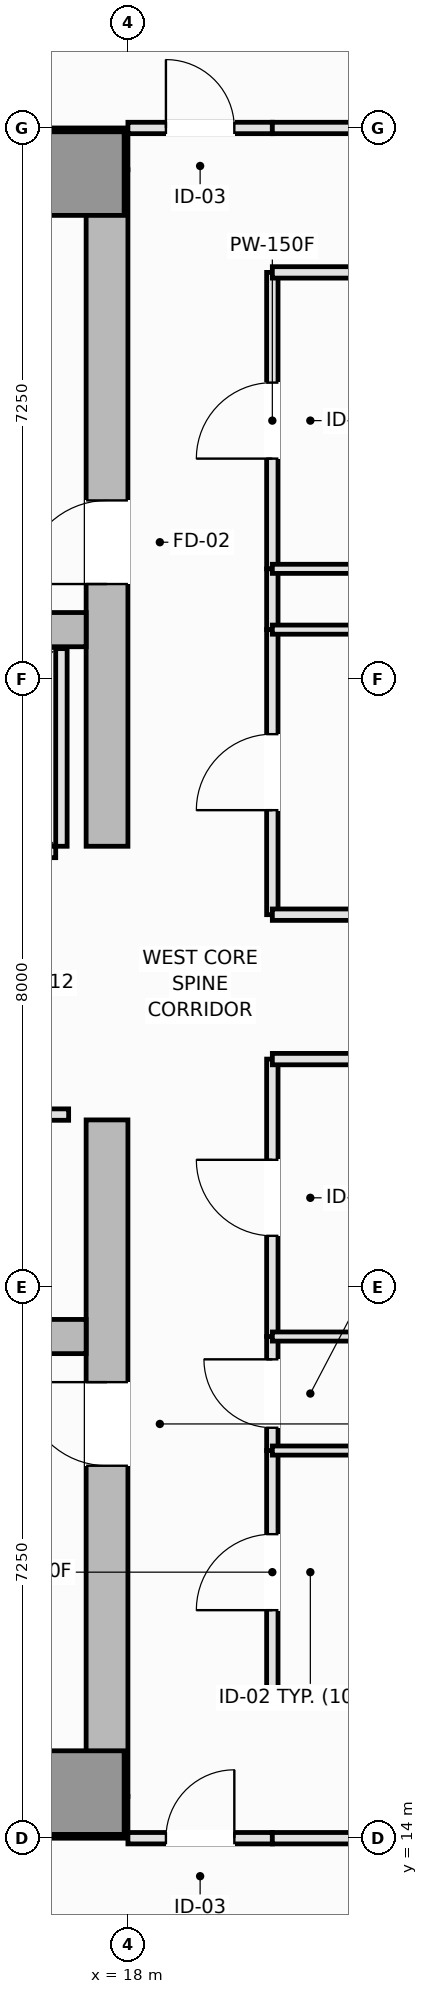
"""IFC4 building model, lengths in metres.
Left out: names, types, materials, properties, quantities, classifications, styles, units other than length and angle.
Written with IfcOpenShell. Run it as: python <this file> out.ifc"""

import sys

from ifc_helpers import new_model, si_unit, direction, frame, frame_2d, origin, origin_2d, place, context, subcontext, project, spatial, rectangle, extrude, element, fill, save


model = new_model("IFC4")
c1 = context("Model", 3, precision=1e-05, world=origin(), true_north=direction((0.0, 1.0)))
c2 = subcontext(c1, "Body", "Model", "MODEL_VIEW")
j1 = project(units=[si_unit("LENGTHUNIT", "METRE"), si_unit("PLANEANGLEUNIT", "RADIAN")], contexts=[c1])
p1 = place(None, origin())
s1 = spatial("IfcSite", under=j1, at=p1, CompositionType="ELEMENT")
p2 = place(p1, origin())
s2 = spatial("IfcBuilding", under=s1, at=p2, CompositionType="ELEMENT")
p3 = place(p2, frame((0.0, 0.0, 212.9)))
s3 = spatial("IfcBuildingStorey", under=s2, at=p3, CompositionType="ELEMENT", Elevation=212.9)
for number, where, z_axis, x_axis in (
    (1, (4.5, 14.275, 0.0), (0.0, 0.0, 1.0), (1.0, 0.0, 0.0)),
    (2, (4.5, 36.225, 0.0), (0.0, 0.0, 1.0), (1.0, 0.0, 0.0)),
):
    element("IfcWall", number, at=place(p3, frame(where, z_axis=z_axis, x_axis=x_axis)), inside=s3, PredefinedType="SHEAR", context=c2, shape_type="SweptSolid", body=[
        extrude(rectangle(XDim=13.5, YDim=0.55, at=frame_2d((6.75, 0.0))), origin(), (0.0, 0.0, 1.0), 3.55),
    ])
p4 = place(p3, frame((17.725, 14.55, 0.0), z_axis=(0.0, 0.0, 1.0), x_axis=(0.0, 1.0, 0.0)))
e3 = element("IfcWall", 3, at=p4, inside=s3, PredefinedType="SHEAR", context=c2, shape_type="SweptSolid", body=[
    extrude(rectangle(XDim=8.9, YDim=0.55, at=frame_2d((4.45, 0.0))), origin(), (0.0, 0.0, 1.0), 3.55),
])
p5 = place(p4, frame((4.35, 0.0, 0.0)))
e4 = element("IfcOpeningElement", 4, at=p5, cuts=e3, PredefinedType="OPENING", context=c2, shape_type="SweptSolid", body=[
    extrude(rectangle(XDim=1.1, YDim=2.15, at=frame_2d((0.55, 1.075))), frame((0.0, 0.285, 0.0), z_axis=(0.0, -1.0, 0.0), x_axis=(1.0, 0.0, 0.0)), (0.0, 0.0, 1.0), 0.57),
])
p6 = place(p3, frame((17.725, 27.05, 0.0), z_axis=(0.0, 0.0, 1.0), x_axis=(0.0, 1.0, 0.0)))
e5 = element("IfcWall", 5, at=p6, inside=s3, PredefinedType="SHEAR", context=c2, shape_type="SweptSolid", body=[
    extrude(rectangle(XDim=8.9, YDim=0.55, at=frame_2d((4.45, 0.0))), origin(), (0.0, 0.0, 1.0), 3.55),
])
p7 = place(p6, frame((3.45, 0.0, 0.0)))
e6 = element("IfcOpeningElement", 6, at=p7, cuts=e5, PredefinedType="OPENING", context=c2, shape_type="SweptSolid", body=[
    extrude(rectangle(XDim=1.1, YDim=2.15, at=frame_2d((0.55, 1.075))), frame((0.0, 0.285, 0.0), z_axis=(0.0, -1.0, 0.0), x_axis=(1.0, 0.0, 0.0)), (0.0, 0.0, 1.0), 0.57),
])
for number, where, z_axis, x_axis in (
    (7, (5.05, 20.6, 0.0), (0.0, 0.0, 1.0), (1.0, 0.0, 0.0)),
    (8, (5.05, 29.9, 0.0), (0.0, 0.0, 1.0), (1.0, 0.0, 0.0)),
):
    element("IfcWall", number, at=place(p3, frame(where, z_axis=z_axis, x_axis=x_axis)), inside=s3, PredefinedType="SHEAR", context=c2, shape_type="SweptSolid", body=[
        extrude(rectangle(XDim=12.4, YDim=0.45, at=frame_2d((6.2, 0.0))), origin(), (0.0, 0.0, 1.0), 3.55),
    ])
for number, where, z_axis, x_axis in (
    (9, (17.4, 14.6, 0.0), (0.0, 0.0, 1.0), (1.0, 0.0, 0.0)),
    (10, (17.4, 35.9, 0.0), (0.0, 0.0, 1.0), (1.0, 0.0, 0.0)),
):
    element("IfcColumn", number, at=place(p3, frame(where, z_axis=z_axis, x_axis=x_axis)), inside=s3, PredefinedType="PILASTER", context=c2, shape_type="SweptSolid", body=[
        extrude(rectangle(XDim=1.1, YDim=1.1, at=origin_2d()), origin(), (0.0, 0.0, 1.0), 3.55),
    ])
p8 = place(p3, frame((14.5, 26.975, 0.0), z_axis=(0.0, 0.0, 1.0), x_axis=(1.0, 0.0, 0.0)))
e11 = element("IfcWall", 11, at=p8, inside=s3, PredefinedType="PARTITIONING", context=c2, shape_type="SweptSolid", body=[
    extrude(rectangle(XDim=2.55, YDim=0.15, at=frame_2d((1.275, 0.0))), origin(), (0.0, 0.0, 1.0), 3.37),
])
p9 = place(p8, frame((0.625, 0.0, 0.0)))
e12 = element("IfcOpeningElement", 12, at=p9, cuts=e11, PredefinedType="OPENING", context=c2, shape_type="SweptSolid", body=[
    extrude(rectangle(XDim=1.3, YDim=2.2, at=frame_2d((0.65, 1.1))), frame((0.0, 0.085, 0.0), z_axis=(0.0, -1.0, 0.0), x_axis=(1.0, 0.0, 0.0)), (0.0, 0.0, 1.0), 0.17),
])
p10 = place(p3, frame((17.125, 27.05, 0.0), z_axis=(0.0, 0.0, 1.0), x_axis=(0.0, 1.0, 0.0)))
e13 = element("IfcWall", 13, at=p10, inside=s3, PredefinedType="PARTITIONING", context=c2, shape_type="SweptSolid", body=[
    extrude(rectangle(XDim=2.6, YDim=0.15, at=frame_2d((1.3, 0.0))), origin(), (0.0, 0.0, 1.0), 3.37),
])
p11 = place(p3, frame((16.05, 23.52, 0.0), z_axis=(0.0, 0.0, 1.0), x_axis=(1.0, 0.0, 0.0)))
e14 = element("IfcWall", 14, at=p11, inside=s3, PredefinedType="PARTITIONING", context=c2, shape_type="SweptSolid", body=[
    extrude(rectangle(XDim=1.17, YDim=0.15, at=frame_2d((0.585, 0.0))), origin(), (0.0, 0.0, 1.0), 3.37),
])
p12 = place(p3, frame((19.9, 15.9, 0.0), z_axis=(0.0, 0.0, 1.0), x_axis=(0.0, 1.0, 0.0)))
e15 = element("IfcWall", 15, at=p12, inside=s3, PredefinedType="PARTITIONING", context=c2, shape_type="SweptSolid", body=[
    extrude(rectangle(XDim=3.2, YDim=0.15, at=frame_2d((1.6, 0.0))), origin(), (0.0, 0.0, 1.0), 3.37),
])
p13 = place(p12, frame((1.1, 0.0, 0.0)))
e16 = element("IfcOpeningElement", 16, at=p13, cuts=e15, PredefinedType="OPENING", context=c2, shape_type="SweptSolid", body=[
    extrude(rectangle(XDim=1.0, YDim=2.15, at=frame_2d((0.5, 1.075))), frame((0.0, 0.085, 0.0), z_axis=(0.0, -1.0, 0.0), x_axis=(1.0, 0.0, 0.0)), (0.0, 0.0, 1.0), 0.17),
])
p14 = place(p3, frame((19.9, 19.1, 0.0), z_axis=(0.0, 0.0, 1.0), x_axis=(0.0, 1.0, 0.0)))
e17 = element("IfcWall", 17, at=p14, inside=s3, PredefinedType="PARTITIONING", context=c2, shape_type="SweptSolid", body=[
    extrude(rectangle(XDim=1.5, YDim=0.15, at=frame_2d((0.75, 0.0))), origin(), (0.0, 0.0, 1.0), 3.37),
])
p15 = place(p14, frame((0.3, 0.0, 0.0)))
e18 = element("IfcOpeningElement", 18, at=p15, cuts=e17, PredefinedType="OPENING", context=c2, shape_type="SweptSolid", body=[
    extrude(rectangle(XDim=0.9, YDim=2.1, at=frame_2d((0.45, 1.05))), frame((0.0, 0.085, 0.0), z_axis=(0.0, -1.0, 0.0), x_axis=(1.0, 0.0, 0.0)), (0.0, 0.0, 1.0), 0.17),
])
p16 = place(p3, frame((19.9, 30.7, 0.0), z_axis=(0.0, 0.0, 1.0), x_axis=(0.0, 1.0, 0.0)))
e19 = element("IfcWall", 19, at=p16, inside=s3, PredefinedType="PARTITIONING", context=c2, shape_type="SweptSolid", body=[
    extrude(rectangle(XDim=3.9, YDim=0.15, at=frame_2d((1.95, 0.0))), origin(), (0.0, 0.0, 1.0), 3.37),
])
p17 = place(p16, frame((1.45, 0.0, 0.0)))
e20 = element("IfcOpeningElement", 20, at=p17, cuts=e19, PredefinedType="OPENING", context=c2, shape_type="SweptSolid", body=[
    extrude(rectangle(XDim=1.0, YDim=2.15, at=frame_2d((0.5, 1.075))), frame((0.0, 0.085, 0.0), z_axis=(0.0, -1.0, 0.0), x_axis=(1.0, 0.0, 0.0)), (0.0, 0.0, 1.0), 0.17),
])
p18 = place(p3, frame((19.9, 29.9, 0.0), z_axis=(0.0, 0.0, 1.0), x_axis=(0.0, 1.0, 0.0)))
e21 = element("IfcWall", 21, at=p18, inside=s3, PredefinedType="PARTITIONING", context=c2, shape_type="SweptSolid", body=[
    extrude(rectangle(XDim=0.8, YDim=0.15, at=frame_2d((0.4, 0.0))), origin(), (0.0, 0.0, 1.0), 3.37),
])
p19 = place(p3, frame((19.9, 20.6, 0.0), z_axis=(0.0, 0.0, 1.0), x_axis=(0.0, 1.0, 0.0)))
e22 = element("IfcWall", 22, at=p19, inside=s3, PredefinedType="PARTITIONING", context=c2, shape_type="SweptSolid", body=[
    extrude(rectangle(XDim=3.65, YDim=0.15, at=frame_2d((1.825, 0.0))), origin(), (0.0, 0.0, 1.0), 3.37),
])
p20 = place(p19, frame((1.325, 0.0, 0.0)))
e23 = element("IfcOpeningElement", 23, at=p20, cuts=e22, PredefinedType="OPENING", context=c2, shape_type="SweptSolid", body=[
    extrude(rectangle(XDim=1.0, YDim=2.15, at=frame_2d((0.5, 1.075))), frame((0.0, 0.085, 0.0), z_axis=(0.0, -1.0, 0.0), x_axis=(1.0, 0.0, 0.0)), (0.0, 0.0, 1.0), 0.17),
])
p21 = place(p3, frame((19.9, 26.15, 0.0), z_axis=(0.0, 0.0, 1.0), x_axis=(0.0, 1.0, 0.0)))
e24 = element("IfcWall", 24, at=p21, inside=s3, PredefinedType="PARTITIONING", context=c2, shape_type="SweptSolid", body=[
    extrude(rectangle(XDim=3.75, YDim=0.15, at=frame_2d((1.875, 0.0))), origin(), (0.0, 0.0, 1.0), 3.37),
])
p22 = place(p21, frame((1.375, 0.0, 0.0)))
e25 = element("IfcOpeningElement", 25, at=p22, cuts=e24, PredefinedType="OPENING", context=c2, shape_type="SweptSolid", body=[
    extrude(rectangle(XDim=1.0, YDim=2.15, at=frame_2d((0.5, 1.075))), frame((0.0, 0.085, 0.0), z_axis=(0.0, -1.0, 0.0), x_axis=(1.0, 0.0, 0.0)), (0.0, 0.0, 1.0), 0.17),
])
p23 = place(p3, frame((18.0, 14.0, 0.0), z_axis=(0.0, 0.0, 1.0), x_axis=(1.0, 0.0, 0.0)))
e26 = element("IfcWall", 26, at=p23, inside=s3, PredefinedType="PARTITIONING", context=c2, shape_type="SweptSolid", body=[
    extrude(rectangle(XDim=1.9, YDim=0.15, at=frame_2d((0.95, 0.0))), origin(), (0.0, 0.0, 1.0), 3.37),
])
p24 = place(p23, frame((0.5, 0.0, 0.0)))
e27 = element("IfcOpeningElement", 27, at=p24, cuts=e26, PredefinedType="OPENING", context=c2, shape_type="SweptSolid", body=[
    extrude(rectangle(XDim=0.9, YDim=2.1, at=frame_2d((0.45, 1.05))), frame((0.0, 0.085, 0.0), z_axis=(0.0, -1.0, 0.0), x_axis=(1.0, 0.0, 0.0)), (0.0, 0.0, 1.0), 0.17),
])
p25 = place(p3, frame((18.0, 36.5, 0.0), z_axis=(0.0, 0.0, 1.0), x_axis=(1.0, 0.0, 0.0)))
e28 = element("IfcWall", 28, at=p25, inside=s3, PredefinedType="PARTITIONING", context=c2, shape_type="SweptSolid", body=[
    extrude(rectangle(XDim=1.9, YDim=0.15, at=frame_2d((0.95, 0.0))), origin(), (0.0, 0.0, 1.0), 3.37),
])
p26 = place(p25, frame((0.5, 0.0, 0.0)))
e29 = element("IfcOpeningElement", 29, at=p26, cuts=e28, PredefinedType="OPENING", context=c2, shape_type="SweptSolid", body=[
    extrude(rectangle(XDim=0.9, YDim=2.1, at=frame_2d((0.45, 1.05))), frame((0.0, 0.085, 0.0), z_axis=(0.0, -1.0, 0.0), x_axis=(1.0, 0.0, 0.0)), (0.0, 0.0, 1.0), 0.17),
])
p27 = place(p3, frame((19.9, 24.25, 0.0), z_axis=(0.0, 0.0, 1.0), x_axis=(1.0, 0.0, 0.0)))
e30 = element("IfcWall", 30, at=p27, inside=s3, PredefinedType="PARTITIONING", context=c2, shape_type="SweptSolid", body=[
    extrude(rectangle(XDim=6.78, YDim=0.15, at=frame_2d((3.39, 0.0))), origin(), (0.0, 0.0, 1.0), 3.37),
])
p28 = place(p3, frame((19.9, 26.15, 0.0), z_axis=(0.0, 0.0, 1.0), x_axis=(1.0, 0.0, 0.0)))
e31 = element("IfcWall", 31, at=p28, inside=s3, PredefinedType="PARTITIONING", context=c2, shape_type="SweptSolid", body=[
    extrude(rectangle(XDim=4.88, YDim=0.15, at=frame_2d((2.44, 0.0))), origin(), (0.0, 0.0, 1.0), 3.37),
])
p29 = place(p3, frame((19.9, 15.9, 0.0), z_axis=(0.0, 0.0, 1.0), x_axis=(1.0, 0.0, 0.0)))
e32 = element("IfcWall", 32, at=p29, inside=s3, PredefinedType="PARTITIONING", context=c2, shape_type="SweptSolid", body=[
    extrude(rectangle(XDim=8.4, YDim=0.15, at=frame_2d((4.2, 0.0))), origin(), (0.0, 0.0, 1.0), 3.37),
])
p30 = place(p3, frame((19.9, 14.0, 0.0), z_axis=(0.0, 0.0, 1.0), x_axis=(1.0, 0.0, 0.0)))
e33 = element("IfcWall", 33, at=p30, inside=s3, PredefinedType="PARTITIONING", context=c2, shape_type="SweptSolid", body=[
    extrude(rectangle(XDim=7.6, YDim=0.15, at=frame_2d((3.8, 0.0))), origin(), (0.0, 0.0, 1.0), 3.37),
])
p31 = place(p3, frame((19.9, 34.6, 0.0), z_axis=(0.0, 0.0, 1.0), x_axis=(1.0, 0.0, 0.0)))
e34 = element("IfcWall", 34, at=p31, inside=s3, PredefinedType="PARTITIONING", context=c2, shape_type="SweptSolid", body=[
    extrude(rectangle(XDim=8.4, YDim=0.15, at=frame_2d((4.2, 0.0))), origin(), (0.0, 0.0, 1.0), 3.37),
])
p32 = place(p3, frame((19.9, 36.5, 0.0), z_axis=(0.0, 0.0, 1.0), x_axis=(1.0, 0.0, 0.0)))
e35 = element("IfcWall", 35, at=p32, inside=s3, PredefinedType="PARTITIONING", context=c2, shape_type="SweptSolid", body=[
    extrude(rectangle(XDim=7.6, YDim=0.15, at=frame_2d((3.8, 0.0))), origin(), (0.0, 0.0, 1.0), 3.37),
])
p33 = place(p3, frame((19.9, 19.1, 0.0), z_axis=(0.0, 0.0, 1.0), x_axis=(1.0, 0.0, 0.0)))
e36 = element("IfcWall", 36, at=p33, inside=s3, PredefinedType="PARTITIONING", context=c2, shape_type="SweptSolid", body=[
    extrude(rectangle(XDim=8.4, YDim=0.12, at=frame_2d((4.2, 0.0))), origin(), (0.0, 0.0, 1.0), 3.37),
])
p34 = place(p3, frame((19.9, 20.6, 0.0), z_axis=(0.0, 0.0, 1.0), x_axis=(1.0, 0.0, 0.0)))
e37 = element("IfcWall", 37, at=p34, inside=s3, PredefinedType="PARTITIONING", context=c2, shape_type="SweptSolid", body=[
    extrude(rectangle(XDim=6.78, YDim=0.12, at=frame_2d((3.39, 0.0))), origin(), (0.0, 0.0, 1.0), 3.37),
])
p35 = place(p3, frame((19.9, 30.7, 0.0), z_axis=(0.0, 0.0, 1.0), x_axis=(1.0, 0.0, 0.0)))
e38 = element("IfcWall", 38, at=p35, inside=s3, PredefinedType="PARTITIONING", context=c2, shape_type="SweptSolid", body=[
    extrude(rectangle(XDim=8.4, YDim=0.12, at=frame_2d((4.2, 0.0))), origin(), (0.0, 0.0, 1.0), 3.37),
])
p36 = place(p35, frame((3.7, 0.0, 0.0)))
e39 = element("IfcOpeningElement", 39, at=p36, cuts=e38, PredefinedType="OPENING", context=c2, shape_type="SweptSolid", body=[
    extrude(rectangle(XDim=1.0, YDim=2.15, at=frame_2d((0.5, 1.075))), frame((0.0, 0.07, 0.0), z_axis=(0.0, -1.0, 0.0), x_axis=(1.0, 0.0, 0.0)), (0.0, 0.0, 1.0), 0.14),
])
p37 = place(p3, frame((19.9, 29.9, 0.0), z_axis=(0.0, 0.0, 1.0), x_axis=(1.0, 0.0, 0.0)))
e40 = element("IfcWall", 40, at=p37, inside=s3, PredefinedType="PARTITIONING", context=c2, shape_type="SweptSolid", body=[
    extrude(rectangle(XDim=4.88, YDim=0.12, at=frame_2d((2.44, 0.0))), origin(), (0.0, 0.0, 1.0), 3.37),
])
p38 = place(p5, origin())
e41 = element("IfcDoor", 41, at=p38, inside=s3, OperationType="SINGLE_SWING_RIGHT", PredefinedType="DOOR", context=c2, shape_type="SweptSolid", body=[
    extrude(rectangle(XDim=1.1, YDim=2.15, at=frame_2d((0.55, 1.075))), frame((0.0, 0.025, 0.0), z_axis=(0.0, -1.0, 0.0), x_axis=(1.0, 0.0, 0.0)), (0.0, 0.0, 1.0), 0.05),
])
fill(e4, e41)
p39 = place(p7, origin())
e42 = element("IfcDoor", 42, at=p39, inside=s3, OperationType="SINGLE_SWING_LEFT", PredefinedType="DOOR", context=c2, shape_type="SweptSolid", body=[
    extrude(rectangle(XDim=1.1, YDim=2.15, at=frame_2d((0.55, 1.075))), frame((0.0, 0.025, 0.0), z_axis=(0.0, -1.0, 0.0), x_axis=(1.0, 0.0, 0.0)), (0.0, 0.0, 1.0), 0.05),
])
fill(e6, e42)
p40 = place(p13, origin())
e43 = element("IfcDoor", 43, at=p40, inside=s3, OperationType="SINGLE_SWING_LEFT", PredefinedType="DOOR", context=c2, shape_type="SweptSolid", body=[
    extrude(rectangle(XDim=1.0, YDim=2.15, at=frame_2d((0.5, 1.075))), frame((0.0, 0.025, 0.0), z_axis=(0.0, -1.0, 0.0), x_axis=(1.0, 0.0, 0.0)), (0.0, 0.0, 1.0), 0.05),
])
fill(e16, e43)
p41 = place(p15, origin())
e44 = element("IfcDoor", 44, at=p41, inside=s3, OperationType="SINGLE_SWING_RIGHT", PredefinedType="DOOR", context=c2, shape_type="SweptSolid", body=[
    extrude(rectangle(XDim=0.9, YDim=2.1, at=frame_2d((0.45, 1.05))), frame((0.0, 0.025, 0.0), z_axis=(0.0, -1.0, 0.0), x_axis=(1.0, 0.0, 0.0)), (0.0, 0.0, 1.0), 0.05),
])
fill(e18, e44)
p42 = place(p17, origin())
e45 = element("IfcDoor", 45, at=p42, inside=s3, OperationType="SINGLE_SWING_LEFT", PredefinedType="DOOR", context=c2, shape_type="SweptSolid", body=[
    extrude(rectangle(XDim=1.0, YDim=2.15, at=frame_2d((0.5, 1.075))), frame((0.0, 0.025, 0.0), z_axis=(0.0, -1.0, 0.0), x_axis=(1.0, 0.0, 0.0)), (0.0, 0.0, 1.0), 0.05),
])
fill(e20, e45)
p43 = place(p20, origin())
e46 = element("IfcDoor", 46, at=p43, inside=s3, OperationType="SINGLE_SWING_RIGHT", PredefinedType="DOOR", context=c2, shape_type="SweptSolid", body=[
    extrude(rectangle(XDim=1.0, YDim=2.15, at=frame_2d((0.5, 1.075))), frame((0.0, 0.025, 0.0), z_axis=(0.0, -1.0, 0.0), x_axis=(1.0, 0.0, 0.0)), (0.0, 0.0, 1.0), 0.05),
])
fill(e23, e46)
p44 = place(p22, origin())
e47 = element("IfcDoor", 47, at=p44, inside=s3, OperationType="SINGLE_SWING_LEFT", PredefinedType="DOOR", context=c2, shape_type="SweptSolid", body=[
    extrude(rectangle(XDim=1.0, YDim=2.15, at=frame_2d((0.5, 1.075))), frame((0.0, 0.025, 0.0), z_axis=(0.0, -1.0, 0.0), x_axis=(1.0, 0.0, 0.0)), (0.0, 0.0, 1.0), 0.05),
])
fill(e25, e47)
p45 = place(p24, origin())
e48 = element("IfcDoor", 48, at=p45, inside=s3, OperationType="SINGLE_SWING_RIGHT", PredefinedType="DOOR", context=c2, shape_type="SweptSolid", body=[
    extrude(rectangle(XDim=0.9, YDim=2.1, at=frame_2d((0.45, 1.05))), frame((0.0, 0.025, 0.0), z_axis=(0.0, -1.0, 0.0), x_axis=(1.0, 0.0, 0.0)), (0.0, 0.0, 1.0), 0.05),
])
fill(e27, e48)
p46 = place(p26, origin())
e49 = element("IfcDoor", 49, at=p46, inside=s3, OperationType="SINGLE_SWING_LEFT", PredefinedType="DOOR", context=c2, shape_type="SweptSolid", body=[
    extrude(rectangle(XDim=0.9, YDim=2.1, at=frame_2d((0.45, 1.05))), frame((0.0, 0.025, 0.0), z_axis=(0.0, -1.0, 0.0), x_axis=(1.0, 0.0, 0.0)), (0.0, 0.0, 1.0), 0.05),
])
fill(e29, e49)
save(model, sys.argv[1])
